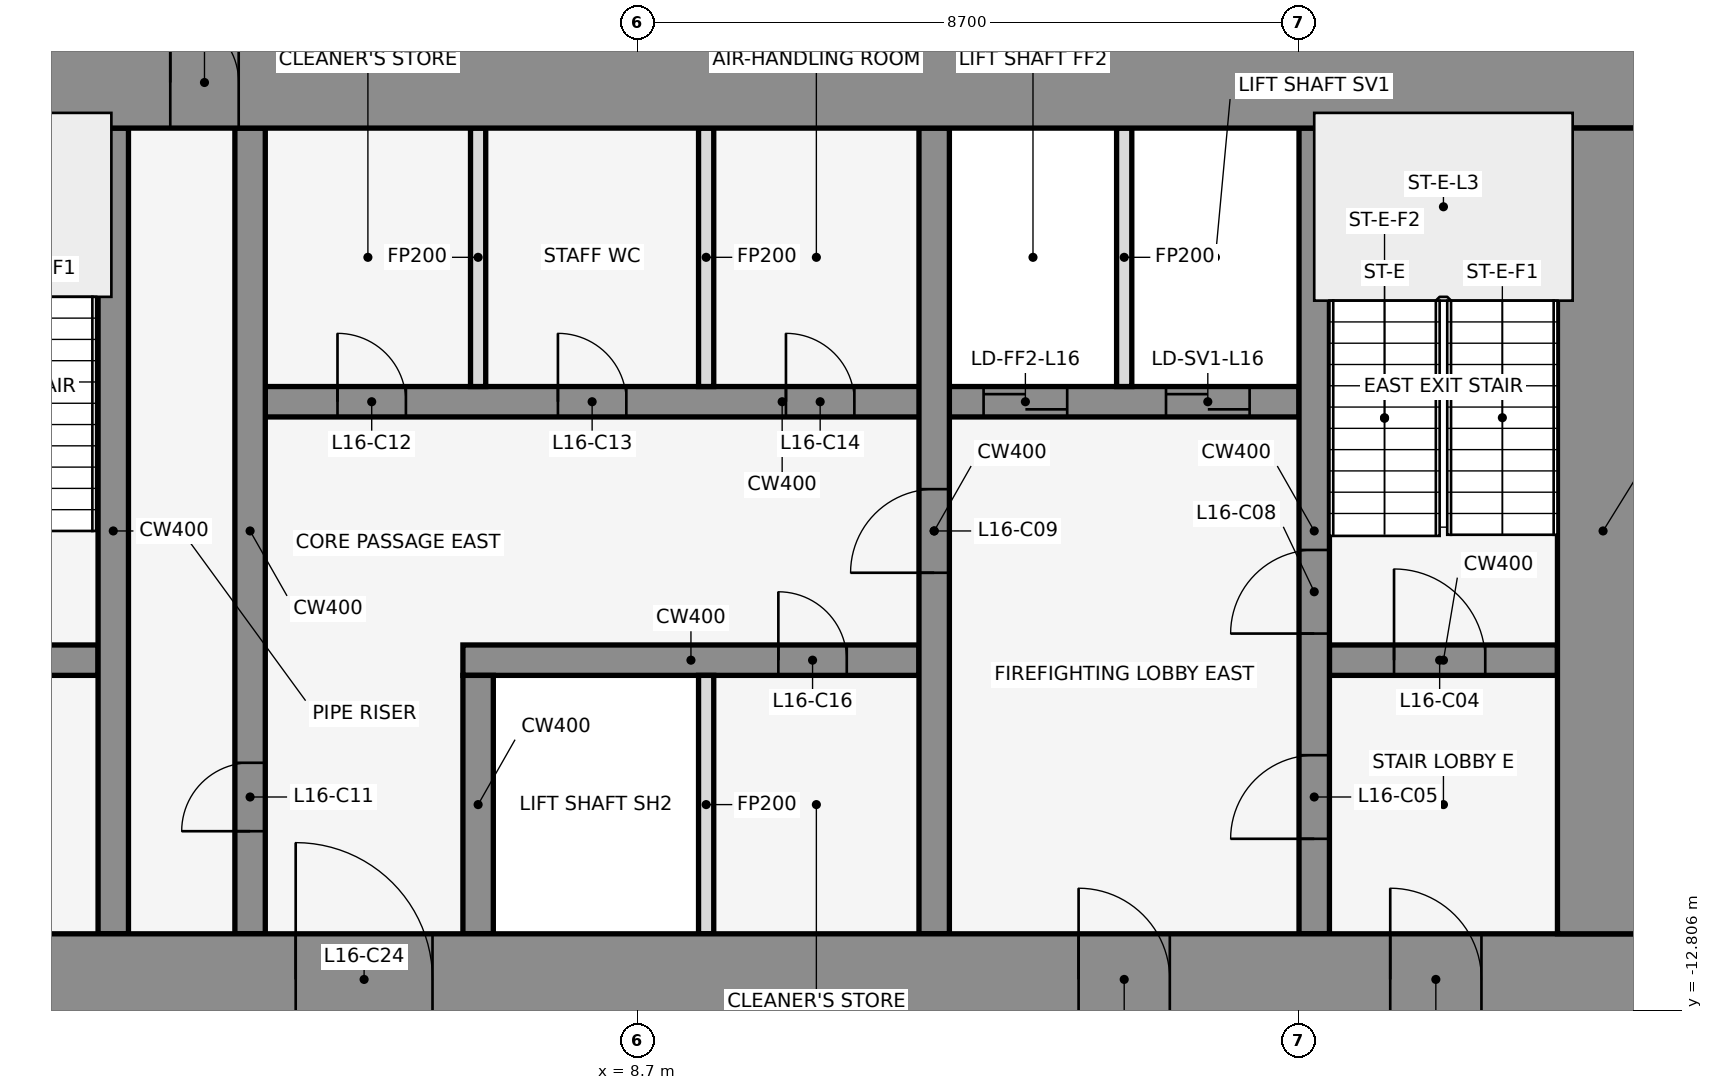
"""IFC4 building model, lengths in metres.
Left out: names, types, materials, properties, quantities, classifications, styles, units other than length and angle.
Written with IfcOpenShell. Run it as: python <this file> out.ifc"""

import sys

from ifc_helpers import new_model, si_unit, direction, frame, frame_2d, origin, place, context, subcontext, project, spatial, rectangle, extrude, element, fill, save


model = new_model("IFC4")
c1 = context("Model", 3, precision=1e-05, world=origin(), true_north=direction((0.0, 1.0)))
c2 = subcontext(c1, "Body", "Model", "MODEL_VIEW")
j1 = project(units=[si_unit("LENGTHUNIT", "METRE"), si_unit("PLANEANGLEUNIT", "RADIAN")], contexts=[c1])
p1 = place(None, origin())
s1 = spatial("IfcSite", under=j1, at=p1, CompositionType="ELEMENT")
p2 = place(p1, origin())
s2 = spatial("IfcBuilding", under=s1, at=p2, CompositionType="ELEMENT")
p3 = place(p2, frame((0.0, 0.0, 80.0)))
s3 = spatial("IfcBuildingStorey", under=s2, at=p3, CompositionType="ELEMENT", Elevation=80.0)
for number, where, z_axis, x_axis in (
    (1, (16.432, -0.105, 0.0), (0.0, 0.0, 1.0), (-0.84, 0.543, 0.0)),
    (2, (1.901, 1.08, 0.0), (0.0, 0.0, 1.0), (-0.84, -0.543, 0.0)),
):
    element("IfcWall", number, at=place(p3, frame(where, z_axis=z_axis, x_axis=x_axis)), inside=s3, PredefinedType="STANDARD", context=c2, shape_type="SweptSolid", body=[
        extrude(rectangle(XDim=2.183, YDim=0.25, at=frame_2d((1.091, 0.0))), origin(), (0.0, 0.0, 1.0), 4.3),
    ])
p4 = place(p3, frame((-1.6, -8.2, 0.0), z_axis=(0.0, 0.0, 1.0), x_axis=(1.0, 0.0, 0.0)))
e3 = element("IfcWall", 3, at=p4, inside=s3, PredefinedType="SHEAR", context=c2, shape_type="SweptSolid", body=[
    extrude(rectangle(XDim=3.2, YDim=0.4, at=frame_2d((1.6, 0.0))), origin(), (0.0, 0.0, 1.0), 4.5),
])
p5 = place(p4, frame((1.05, 0.0, 0.0)))
e4 = element("IfcOpeningElement", 4, at=p5, cuts=e3, PredefinedType="OPENING", context=c2, shape_type="SweptSolid", body=[
    extrude(rectangle(XDim=1.2, YDim=2.1, at=frame_2d((0.6, 1.05))), frame((0.0, 0.212, 0.0), z_axis=(0.0, -1.0, 0.0), x_axis=(1.0, 0.0, 0.0)), (0.0, 0.0, 1.0), 0.424),
])
p6 = place(p3, frame((6.4, -8.2, 0.0), z_axis=(0.0, 0.0, 1.0), x_axis=(1.0, 0.0, 0.0)))
e5 = element("IfcWall", 5, at=p6, inside=s3, PredefinedType="SHEAR", context=c2, shape_type="SweptSolid", body=[
    extrude(rectangle(XDim=6.0, YDim=0.4, at=frame_2d((3.0, 0.0))), origin(), (0.0, 0.0, 1.0), 4.5),
])
p7 = place(p6, frame((4.15, 0.0, 0.0)))
e6 = element("IfcOpeningElement", 6, at=p7, cuts=e5, PredefinedType="OPENING", context=c2, shape_type="SweptSolid", body=[
    extrude(rectangle(XDim=0.9, YDim=2.1, at=frame_2d((0.45, 1.05))), frame((0.0, 0.212, 0.0), z_axis=(0.0, -1.0, 0.0), x_axis=(1.0, 0.0, 0.0)), (0.0, 0.0, 1.0), 0.424),
])
p8 = place(p3, frame((17.8, -8.2, 0.0), z_axis=(0.0, 0.0, 1.0), x_axis=(1.0, 0.0, 0.0)))
e7 = element("IfcWall", 7, at=p8, inside=s3, PredefinedType="SHEAR", context=c2, shape_type="SweptSolid", body=[
    extrude(rectangle(XDim=3.0, YDim=0.4, at=frame_2d((1.5, 0.0))), origin(), (0.0, 0.0, 1.0), 4.5),
])
p9 = place(p8, frame((0.85, 0.0, 0.0)))
e8 = element("IfcOpeningElement", 8, at=p9, cuts=e7, PredefinedType="OPENING", context=c2, shape_type="SweptSolid", body=[
    extrude(rectangle(XDim=1.2, YDim=2.1, at=frame_2d((0.6, 1.05))), frame((0.0, 0.212, 0.0), z_axis=(0.0, -1.0, 0.0), x_axis=(1.0, 0.0, 0.0)), (0.0, 0.0, 1.0), 0.424),
])
p10 = place(p3, frame((3.8, -4.8, 0.0), z_axis=(0.0, 0.0, 1.0), x_axis=(1.0, 0.0, 0.0)))
e9 = element("IfcWall", 9, at=p10, inside=s3, PredefinedType="SHEAR", context=c2, shape_type="SweptSolid", body=[
    extrude(rectangle(XDim=13.6, YDim=0.4, at=frame_2d((6.8, 0.0))), origin(), (0.0, 0.0, 1.0), 4.5),
])
p11 = place(p10, frame((9.45, 0.0, 0.0)))
e10 = element("IfcOpeningElement", 10, at=p11, cuts=e9, PredefinedType="OPENING", context=c2, shape_type="SweptSolid", body=[
    extrude(rectangle(XDim=1.1, YDim=2.1, at=frame_2d((0.55, 1.05))), frame((0.0, 0.212, 0.0), z_axis=(0.0, -1.0, 0.0), x_axis=(1.0, 0.0, 0.0)), (0.0, 0.0, 1.0), 0.424),
])
p12 = place(p10, frame((11.85, 0.0, 0.0)))
e11 = element("IfcOpeningElement", 11, at=p12, cuts=e9, PredefinedType="OPENING", context=c2, shape_type="SweptSolid", body=[
    extrude(rectangle(XDim=1.1, YDim=2.1, at=frame_2d((0.55, 1.05))), frame((0.0, 0.212, 0.0), z_axis=(0.0, -1.0, 0.0), x_axis=(1.0, 0.0, 0.0)), (0.0, 0.0, 1.0), 0.424),
])
p13 = place(p10, frame((0.95, 0.0, 0.0)))
e12 = element("IfcOpeningElement", 12, at=p13, cuts=e9, PredefinedType="OPENING", context=c2, shape_type="SweptSolid", body=[
    extrude(rectangle(XDim=0.9, YDim=2.1, at=frame_2d((0.45, 1.05))), frame((0.0, 0.212, 0.0), z_axis=(0.0, -1.0, 0.0), x_axis=(1.0, 0.0, 0.0)), (0.0, 0.0, 1.0), 0.424),
])
p14 = place(p10, frame((3.85, 0.0, 0.0)))
e13 = element("IfcOpeningElement", 13, at=p14, cuts=e9, PredefinedType="OPENING", context=c2, shape_type="SweptSolid", body=[
    extrude(rectangle(XDim=0.9, YDim=2.1, at=frame_2d((0.45, 1.05))), frame((0.0, 0.212, 0.0), z_axis=(0.0, -1.0, 0.0), x_axis=(1.0, 0.0, 0.0)), (0.0, 0.0, 1.0), 0.424),
])
p15 = place(p10, frame((6.85, 0.0, 0.0)))
e14 = element("IfcOpeningElement", 14, at=p15, cuts=e9, PredefinedType="OPENING", context=c2, shape_type="SweptSolid", body=[
    extrude(rectangle(XDim=0.9, YDim=2.1, at=frame_2d((0.45, 1.05))), frame((0.0, 0.212, 0.0), z_axis=(0.0, -1.0, 0.0), x_axis=(1.0, 0.0, 0.0)), (0.0, 0.0, 1.0), 0.424),
])
p16 = place(p3, frame((1.8, -11.8, 0.0), z_axis=(0.0, 0.0, 1.0), x_axis=(0.0, 1.0, 0.0)))
e15 = element("IfcWall", 15, at=p16, inside=s3, PredefinedType="SHEAR", context=c2, shape_type="SweptSolid", body=[
    extrude(rectangle(XDim=10.6, YDim=0.4, at=frame_2d((5.3, 0.0))), origin(), (0.0, 0.0, 1.0), 4.5),
])
p17 = place(p3, frame((3.6, -11.8, 0.0), z_axis=(0.0, 0.0, 1.0), x_axis=(0.0, 1.0, 0.0)))
e16 = element("IfcWall", 16, at=p17, inside=s3, PredefinedType="SHEAR", context=c2, shape_type="SweptSolid", body=[
    extrude(rectangle(XDim=10.6, YDim=0.4, at=frame_2d((5.3, 0.0))), origin(), (0.0, 0.0, 1.0), 4.5),
])
p18 = place(p17, frame((1.35, 0.0, 0.0)))
e17 = element("IfcOpeningElement", 17, at=p18, cuts=e16, PredefinedType="OPENING", context=c2, shape_type="SweptSolid", body=[
    extrude(rectangle(XDim=0.9, YDim=2.1, at=frame_2d((0.45, 1.05))), frame((0.0, 0.212, 0.0), z_axis=(0.0, -1.0, 0.0), x_axis=(1.0, 0.0, 0.0)), (0.0, 0.0, 1.0), 0.424),
])
p19 = place(p3, frame((6.6, -11.8, 0.0), z_axis=(0.0, 0.0, 1.0), x_axis=(0.0, 1.0, 0.0)))
e18 = element("IfcWall", 18, at=p19, inside=s3, PredefinedType="SHEAR", context=c2, shape_type="SweptSolid", body=[
    extrude(rectangle(XDim=3.4, YDim=0.4, at=frame_2d((1.7, 0.0))), origin(), (0.0, 0.0, 1.0), 4.5),
])
for number, where, z_axis, x_axis in (
    (19, (6.6, -4.6, 0.0), (0.0, 0.0, 1.0), (0.0, 1.0, 0.0)),
    (20, (9.6, -11.8, 0.0), (0.0, 0.0, 1.0), (0.0, 1.0, 0.0)),
    (21, (9.6, -4.6, 0.0), (0.0, 0.0, 1.0), (0.0, 1.0, 0.0)),
):
    element("IfcWall", number, at=place(p3, frame(where, z_axis=z_axis, x_axis=x_axis)), inside=s3, PredefinedType="PARTITIONING", context=c2, shape_type="SweptSolid", body=[
        extrude(rectangle(XDim=3.4, YDim=0.2, at=frame_2d((1.7, 0.0))), origin(), (0.0, 0.0, 1.0), 3.368),
    ])
p20 = place(p3, frame((12.6, -11.8, 0.0), z_axis=(0.0, 0.0, 1.0), x_axis=(0.0, 1.0, 0.0)))
e22 = element("IfcWall", 22, at=p20, inside=s3, PredefinedType="SHEAR", context=c2, shape_type="SweptSolid", body=[
    extrude(rectangle(XDim=10.6, YDim=0.4, at=frame_2d((5.3, 0.0))), origin(), (0.0, 0.0, 1.0), 4.5),
])
p21 = place(p20, frame((4.75, 0.0, 0.0)))
e23 = element("IfcOpeningElement", 23, at=p21, cuts=e22, PredefinedType="OPENING", context=c2, shape_type="SweptSolid", body=[
    extrude(rectangle(XDim=1.1, YDim=2.1, at=frame_2d((0.55, 1.05))), frame((0.0, 0.212, 0.0), z_axis=(0.0, -1.0, 0.0), x_axis=(1.0, 0.0, 0.0)), (0.0, 0.0, 1.0), 0.424),
])
p22 = place(p3, frame((15.1, -4.6, 0.0), z_axis=(0.0, 0.0, 1.0), x_axis=(0.0, 1.0, 0.0)))
e24 = element("IfcWall", 24, at=p22, inside=s3, PredefinedType="PARTITIONING", context=c2, shape_type="SweptSolid", body=[
    extrude(rectangle(XDim=3.4, YDim=0.2, at=frame_2d((1.7, 0.0))), origin(), (0.0, 0.0, 1.0), 3.368),
])
p23 = place(p3, frame((17.6, -11.8, 0.0), z_axis=(0.0, 0.0, 1.0), x_axis=(0.0, 1.0, 0.0)))
e25 = element("IfcWall", 25, at=p23, inside=s3, PredefinedType="SHEAR", context=c2, shape_type="SweptSolid", body=[
    extrude(rectangle(XDim=10.6, YDim=0.4, at=frame_2d((5.3, 0.0))), origin(), (0.0, 0.0, 1.0), 4.5),
])
p24 = place(p23, frame((1.25, 0.0, 0.0)))
e26 = element("IfcOpeningElement", 26, at=p24, cuts=e25, PredefinedType="OPENING", context=c2, shape_type="SweptSolid", body=[
    extrude(rectangle(XDim=1.1, YDim=2.1, at=frame_2d((0.55, 1.05))), frame((0.0, 0.212, 0.0), z_axis=(0.0, -1.0, 0.0), x_axis=(1.0, 0.0, 0.0)), (0.0, 0.0, 1.0), 0.424),
])
p25 = place(p23, frame((3.95, 0.0, 0.0)))
e27 = element("IfcOpeningElement", 27, at=p25, cuts=e25, PredefinedType="OPENING", context=c2, shape_type="SweptSolid", body=[
    extrude(rectangle(XDim=1.1, YDim=2.1, at=frame_2d((0.55, 1.05))), frame((0.0, 0.212, 0.0), z_axis=(0.0, -1.0, 0.0), x_axis=(1.0, 0.0, 0.0)), (0.0, 0.0, 1.0), 0.424),
])
p26 = place(p3, frame((-22.0, -0.6, 0.0), z_axis=(0.0, 0.0, 1.0), x_axis=(1.0, 0.0, 0.0)))
e28 = element("IfcWall", 28, at=p26, inside=s3, PredefinedType="SHEAR", context=c2, shape_type="SweptSolid", body=[
    extrude(rectangle(XDim=44.0, YDim=1.2, at=frame_2d((22.0, 0.0))), origin(), (0.0, 0.0, 1.0), 4.5),
])
p27 = place(p26, frame((18.55, 0.0, 0.0)))
e29 = element("IfcOpeningElement", 29, at=p27, cuts=e28, PredefinedType="OPENING", context=c2, shape_type="SweptSolid", body=[
    extrude(rectangle(XDim=0.9, YDim=2.1, at=frame_2d((0.45, 1.05))), frame((0.0, 0.612, 0.0), z_axis=(0.0, -1.0, 0.0), x_axis=(1.0, 0.0, 0.0)), (0.0, 0.0, 1.0), 1.224),
])
p28 = place(p26, frame((24.55, 0.0, 0.0)))
e30 = element("IfcOpeningElement", 30, at=p28, cuts=e28, PredefinedType="OPENING", context=c2, shape_type="SweptSolid", body=[
    extrude(rectangle(XDim=0.9, YDim=2.1, at=frame_2d((0.45, 1.05))), frame((0.0, 0.612, 0.0), z_axis=(0.0, -1.0, 0.0), x_axis=(1.0, 0.0, 0.0)), (0.0, 0.0, 1.0), 1.224),
])
p29 = place(p3, frame((-22.0, -12.4, 0.0), z_axis=(0.0, 0.0, 1.0), x_axis=(1.0, 0.0, 0.0)))
e31 = element("IfcWall", 31, at=p29, inside=s3, PredefinedType="SHEAR", context=c2, shape_type="SweptSolid", body=[
    extrude(rectangle(XDim=44.0, YDim=1.2, at=frame_2d((22.0, 0.0))), origin(), (0.0, 0.0, 1.0), 4.5),
])
p30 = place(p29, frame((2.2, 0.0, 0.0)))
e32 = element("IfcOpeningElement", 32, at=p30, cuts=e31, PredefinedType="OPENING", context=c2, shape_type="SweptSolid", body=[
    extrude(rectangle(XDim=1.2, YDim=2.1, at=frame_2d((0.6, 1.05))), frame((0.0, 0.612, 0.0), z_axis=(0.0, -1.0, 0.0), x_axis=(1.0, 0.0, 0.0)), (0.0, 0.0, 1.0), 1.224),
])
p31 = place(p29, frame((21.4, 0.0, 0.0)))
e33 = element("IfcOpeningElement", 33, at=p31, cuts=e31, PredefinedType="OPENING", context=c2, shape_type="SweptSolid", body=[
    extrude(rectangle(XDim=1.2, YDim=2.1, at=frame_2d((0.6, 1.05))), frame((0.0, 0.612, 0.0), z_axis=(0.0, -1.0, 0.0), x_axis=(1.0, 0.0, 0.0)), (0.0, 0.0, 1.0), 1.224),
])
p32 = place(p29, frame((40.6, 0.0, 0.0)))
e34 = element("IfcOpeningElement", 34, at=p32, cuts=e31, PredefinedType="OPENING", context=c2, shape_type="SweptSolid", body=[
    extrude(rectangle(XDim=1.2, YDim=2.1, at=frame_2d((0.6, 1.05))), frame((0.0, 0.612, 0.0), z_axis=(0.0, -1.0, 0.0), x_axis=(1.0, 0.0, 0.0)), (0.0, 0.0, 1.0), 1.224),
])
p33 = place(p29, frame((16.0, 0.0, 0.0)))
e35 = element("IfcOpeningElement", 35, at=p33, cuts=e31, PredefinedType="OPENING", context=c2, shape_type="SweptSolid", body=[
    extrude(rectangle(XDim=1.8, YDim=2.1, at=frame_2d((0.9, 1.05))), frame((0.0, 0.612, 0.0), z_axis=(0.0, -1.0, 0.0), x_axis=(1.0, 0.0, 0.0)), (0.0, 0.0, 1.0), 1.224),
])
p34 = place(p29, frame((6.3, 0.0, 0.0)))
e36 = element("IfcOpeningElement", 36, at=p34, cuts=e31, PredefinedType="OPENING", context=c2, shape_type="SweptSolid", body=[
    extrude(rectangle(XDim=1.2, YDim=2.1, at=frame_2d((0.6, 1.05))), frame((0.0, 0.612, 0.0), z_axis=(0.0, -1.0, 0.0), x_axis=(1.0, 0.0, 0.0)), (0.0, 0.0, 1.0), 1.224),
])
p35 = place(p29, frame((26.2, 0.0, 0.0)))
e37 = element("IfcOpeningElement", 37, at=p35, cuts=e31, PredefinedType="OPENING", context=c2, shape_type="SweptSolid", body=[
    extrude(rectangle(XDim=1.8, YDim=2.1, at=frame_2d((0.9, 1.05))), frame((0.0, 0.612, 0.0), z_axis=(0.0, -1.0, 0.0), x_axis=(1.0, 0.0, 0.0)), (0.0, 0.0, 1.0), 1.224),
])
p36 = place(p29, frame((36.5, 0.0, 0.0)))
e38 = element("IfcOpeningElement", 38, at=p36, cuts=e31, PredefinedType="OPENING", context=c2, shape_type="SweptSolid", body=[
    extrude(rectangle(XDim=1.2, YDim=2.1, at=frame_2d((0.6, 1.05))), frame((0.0, 0.612, 0.0), z_axis=(0.0, -1.0, 0.0), x_axis=(1.0, 0.0, 0.0)), (0.0, 0.0, 1.0), 1.224),
])
p37 = place(p3, frame((21.4, -11.8, 0.0), z_axis=(0.0, 0.0, 1.0), x_axis=(0.0, 1.0, 0.0)))
e39 = element("IfcWall", 39, at=p37, inside=s3, PredefinedType="SHEAR", context=c2, shape_type="SweptSolid", body=[
    extrude(rectangle(XDim=10.6, YDim=1.2, at=frame_2d((5.3, 0.0))), origin(), (0.0, 0.0, 1.0), 4.5),
])
p38 = place(p9, origin())
e40 = element("IfcDoor", 40, at=p38, inside=s3, OperationType="SINGLE_SWING_RIGHT", PredefinedType="DOOR", context=c2, shape_type="SweptSolid", body=[
    extrude(rectangle(XDim=1.2, YDim=2.1, at=frame_2d((0.6, 1.05))), frame((0.0, 0.025, 0.0), z_axis=(0.0, -1.0, 0.0), x_axis=(1.0, 0.0, 0.0)), (0.0, 0.0, 1.0), 0.05),
])
fill(e8, e40)
p39 = place(p24, origin())
e41 = element("IfcDoor", 41, at=p39, inside=s3, OperationType="SINGLE_SWING_LEFT", PredefinedType="DOOR", context=c2, shape_type="SweptSolid", body=[
    extrude(rectangle(XDim=1.1, YDim=2.1, at=frame_2d((0.55, 1.05))), frame((0.0, 0.025, 0.0), z_axis=(0.0, -1.0, 0.0), x_axis=(1.0, 0.0, 0.0)), (0.0, 0.0, 1.0), 0.05),
])
fill(e26, e41)
p40 = place(p11, origin())
e42 = element("IfcDoor", 42, at=p40, inside=s3, OperationType="DOUBLE_DOOR_SLIDING", PredefinedType="DOOR", context=c2, shape_type="SweptSolid", body=[
    extrude(rectangle(XDim=1.1, YDim=2.1, at=frame_2d((0.55, 1.05))), frame((0.0, 0.025, 0.0), z_axis=(0.0, -1.0, 0.0), x_axis=(1.0, 0.0, 0.0)), (0.0, 0.0, 1.0), 0.05),
])
fill(e10, e42)
p41 = place(p12, origin())
e43 = element("IfcDoor", 43, at=p41, inside=s3, OperationType="DOUBLE_DOOR_SLIDING", PredefinedType="DOOR", context=c2, shape_type="SweptSolid", body=[
    extrude(rectangle(XDim=1.1, YDim=2.1, at=frame_2d((0.55, 1.05))), frame((0.0, 0.025, 0.0), z_axis=(0.0, -1.0, 0.0), x_axis=(1.0, 0.0, 0.0)), (0.0, 0.0, 1.0), 0.05),
])
fill(e11, e43)
p42 = place(p25, origin())
e44 = element("IfcDoor", 44, at=p42, inside=s3, OperationType="SINGLE_SWING_RIGHT", PredefinedType="DOOR", context=c2, shape_type="SweptSolid", body=[
    extrude(rectangle(XDim=1.1, YDim=2.1, at=frame_2d((0.55, 1.05))), frame((0.0, 0.025, 0.0), z_axis=(0.0, -1.0, 0.0), x_axis=(1.0, 0.0, 0.0)), (0.0, 0.0, 1.0), 0.05),
])
fill(e27, e44)
p43 = place(p21, frame((1.1, 0.0, 0.0), z_axis=(0.0, 0.0, 1.0), x_axis=(-1.0, 0.0, 0.0)))
e45 = element("IfcDoor", 45, at=p43, inside=s3, OperationType="SINGLE_SWING_RIGHT", PredefinedType="DOOR", context=c2, shape_type="SweptSolid", body=[
    extrude(rectangle(XDim=1.1, YDim=2.1, at=frame_2d((0.55, 1.05))), frame((0.0, 0.025, 0.0), z_axis=(0.0, -1.0, 0.0), x_axis=(1.0, 0.0, 0.0)), (0.0, 0.0, 1.0), 0.05),
])
fill(e23, e45)
p44 = place(p18, origin())
e46 = element("IfcDoor", 46, at=p44, inside=s3, OperationType="SINGLE_SWING_LEFT", PredefinedType="DOOR", context=c2, shape_type="SweptSolid", body=[
    extrude(rectangle(XDim=0.9, YDim=2.1, at=frame_2d((0.45, 1.05))), frame((0.0, 0.025, 0.0), z_axis=(0.0, -1.0, 0.0), x_axis=(1.0, 0.0, 0.0)), (0.0, 0.0, 1.0), 0.05),
])
fill(e17, e46)
p45 = place(p13, origin())
e47 = element("IfcDoor", 47, at=p45, inside=s3, OperationType="SINGLE_SWING_RIGHT", PredefinedType="DOOR", context=c2, shape_type="SweptSolid", body=[
    extrude(rectangle(XDim=0.9, YDim=2.1, at=frame_2d((0.45, 1.05))), frame((0.0, 0.025, 0.0), z_axis=(0.0, -1.0, 0.0), x_axis=(1.0, 0.0, 0.0)), (0.0, 0.0, 1.0), 0.05),
])
fill(e12, e47)
p46 = place(p14, origin())
e48 = element("IfcDoor", 48, at=p46, inside=s3, OperationType="SINGLE_SWING_LEFT", PredefinedType="DOOR", context=c2, shape_type="SweptSolid", body=[
    extrude(rectangle(XDim=0.9, YDim=2.1, at=frame_2d((0.45, 1.05))), frame((0.0, 0.025, 0.0), z_axis=(0.0, -1.0, 0.0), x_axis=(1.0, 0.0, 0.0)), (0.0, 0.0, 1.0), 0.05),
])
fill(e13, e48)
p47 = place(p15, origin())
e49 = element("IfcDoor", 49, at=p47, inside=s3, OperationType="SINGLE_SWING_RIGHT", PredefinedType="DOOR", context=c2, shape_type="SweptSolid", body=[
    extrude(rectangle(XDim=0.9, YDim=2.1, at=frame_2d((0.45, 1.05))), frame((0.0, 0.025, 0.0), z_axis=(0.0, -1.0, 0.0), x_axis=(1.0, 0.0, 0.0)), (0.0, 0.0, 1.0), 0.05),
])
fill(e14, e49)
p48 = place(p7, frame((0.9, 0.0, 0.0), z_axis=(0.0, 0.0, 1.0), x_axis=(-1.0, 0.0, 0.0)))
e50 = element("IfcDoor", 50, at=p48, inside=s3, OperationType="SINGLE_SWING_LEFT", PredefinedType="DOOR", context=c2, shape_type="SweptSolid", body=[
    extrude(rectangle(XDim=0.9, YDim=2.1, at=frame_2d((0.45, 1.05))), frame((0.0, 0.025, 0.0), z_axis=(0.0, -1.0, 0.0), x_axis=(1.0, 0.0, 0.0)), (0.0, 0.0, 1.0), 0.05),
])
fill(e6, e50)
p49 = place(p28, origin())
e51 = element("IfcDoor", 51, at=p49, inside=s3, OperationType="SINGLE_SWING_LEFT", PredefinedType="DOOR", context=c2, shape_type="SweptSolid", body=[
    extrude(rectangle(XDim=0.9, YDim=2.1, at=frame_2d((0.45, 1.05))), frame((0.0, 0.025, 0.0), z_axis=(0.0, -1.0, 0.0), x_axis=(1.0, 0.0, 0.0)), (0.0, 0.0, 1.0), 0.05),
])
fill(e30, e51)
p50 = place(p32, frame((1.2, 0.0, 0.0), z_axis=(0.0, 0.0, 1.0), x_axis=(-1.0, 0.0, 0.0)))
e52 = element("IfcDoor", 52, at=p50, inside=s3, OperationType="SINGLE_SWING_RIGHT", PredefinedType="DOOR", context=c2, shape_type="SweptSolid", body=[
    extrude(rectangle(XDim=1.2, YDim=2.1, at=frame_2d((0.6, 1.05))), frame((0.0, 0.025, 0.0), z_axis=(0.0, -1.0, 0.0), x_axis=(1.0, 0.0, 0.0)), (0.0, 0.0, 1.0), 0.05),
])
fill(e34, e52)
p51 = place(p35, origin())
e53 = element("IfcDoor", 53, at=p51, inside=s3, OperationType="SINGLE_SWING_LEFT", PredefinedType="DOOR", context=c2, shape_type="SweptSolid", body=[
    extrude(rectangle(XDim=1.8, YDim=2.1, at=frame_2d((0.9, 1.05))), frame((0.0, 0.025, 0.0), z_axis=(0.0, -1.0, 0.0), x_axis=(1.0, 0.0, 0.0)), (0.0, 0.0, 1.0), 0.05),
])
fill(e37, e53)
p52 = place(p36, frame((1.2, 0.0, 0.0), z_axis=(0.0, 0.0, 1.0), x_axis=(-1.0, 0.0, 0.0)))
e54 = element("IfcDoor", 54, at=p52, inside=s3, OperationType="SINGLE_SWING_RIGHT", PredefinedType="DOOR", context=c2, shape_type="SweptSolid", body=[
    extrude(rectangle(XDim=1.2, YDim=2.1, at=frame_2d((0.6, 1.05))), frame((0.0, 0.025, 0.0), z_axis=(0.0, -1.0, 0.0), x_axis=(1.0, 0.0, 0.0)), (0.0, 0.0, 1.0), 0.05),
])
fill(e38, e54)
save(model, sys.argv[1])
